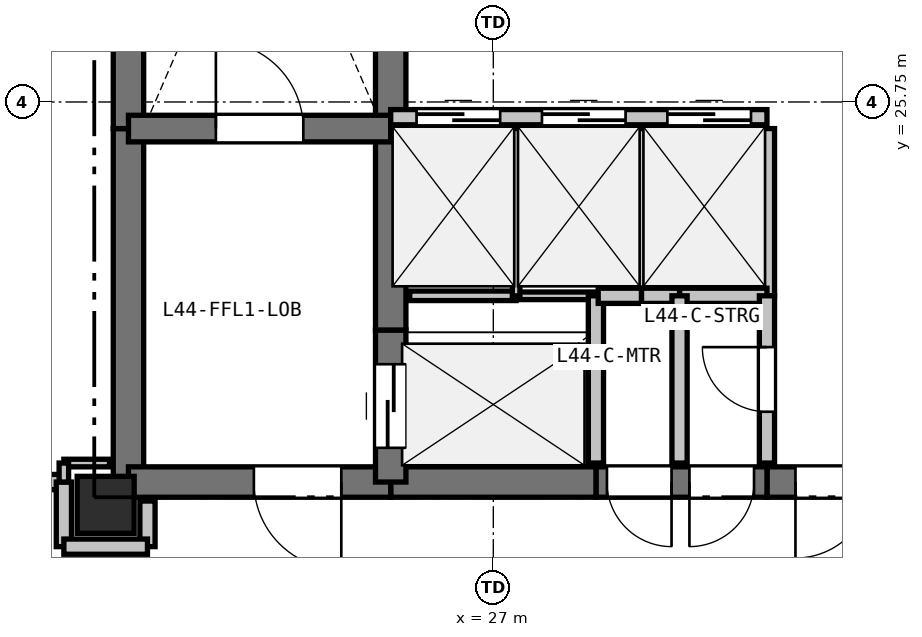
"""IFC4 building model, lengths in metres.
Left out: names, types, materials, properties, quantities, classifications, styles, units other than length and angle.
Written with IfcOpenShell. Run it as: python <this file> out.ifc"""

import sys

from ifc_helpers import new_model, si_unit, direction, frame, frame_2d, origin, origin_2d, place, context, subcontext, project, spatial, rectangle, extrude, element, fill, save


model = new_model("IFC4")
c1 = context("Model", 3, precision=1e-05, world=origin(), true_north=direction((0.0, 1.0)))
c2 = subcontext(c1, "Body", "Model", "MODEL_VIEW")
j1 = project(units=[si_unit("LENGTHUNIT", "METRE"), si_unit("PLANEANGLEUNIT", "RADIAN")], contexts=[c1])
p1 = place(None, origin())
s1 = spatial("IfcSite", under=j1, at=p1, CompositionType="ELEMENT")
p2 = place(p1, origin())
s2 = spatial("IfcBuilding", under=s1, at=p2, CompositionType="ELEMENT")
p3 = place(p2, frame((0.0, 0.0, 157.5)))
s3 = spatial("IfcBuildingStorey", under=s2, at=p3, CompositionType="ELEMENT", Elevation=157.5)
p4 = place(p3, frame((21.9, 20.45, 0.0), z_axis=(0.0, 0.0, 1.0), x_axis=(1.0, 0.0, 0.0)))
e1 = element("IfcColumn", 1, at=p4, inside=s3, PredefinedType="COLUMN", context=c2, shape_type="SweptSolid", body=[
    extrude(rectangle(XDim=0.75, YDim=0.75, at=origin_2d()), origin(), (0.0, 0.0, 1.0), 3.3),
])
p5 = place(p3, frame((22.2, 20.75, 0.0), z_axis=(0.0, 0.0, 1.0), x_axis=(0.0, 1.0, 0.0)))
e2 = element("IfcWall", 2, at=p5, inside=s3, PredefinedType="SHEAR", context=c2, shape_type="SweptSolid", body=[
    extrude(rectangle(XDim=4.65, YDim=0.4, at=frame_2d((2.325, 0.0))), origin(), (0.0, 0.0, 1.0), 2.98),
])
p6 = place(p3, frame((22.2, 25.4, 0.0), z_axis=(0.0, 0.0, 1.0), x_axis=(0.0, 1.0, 0.0)))
e3 = element("IfcWall", 3, at=p6, inside=s3, PredefinedType="SHEAR", context=c2, shape_type="SweptSolid", body=[
    extrude(rectangle(XDim=7.35, YDim=0.4, at=frame_2d((3.675, 0.0))), origin(), (0.0, 0.0, 1.0), 2.98),
])
p7 = place(p3, frame((32.35, 20.75, 0.0), z_axis=(0.0, 0.0, 1.0), x_axis=(-1.0, 0.0, 0.0)))
e4 = element("IfcWall", 4, at=p7, inside=s3, PredefinedType="SHEAR", context=c2, shape_type="SweptSolid", body=[
    extrude(rectangle(XDim=1.75, YDim=0.4, at=frame_2d((0.875, 0.0))), origin(), (0.0, 0.0, 1.0), 2.98),
])
p8 = place(p7, frame((0.375, 0.0, 0.0)))
e5 = element("IfcOpeningElement", 5, at=p8, cuts=e4, PredefinedType="OPENING", context=c2, shape_type="SweptSolid", body=[
    extrude(rectangle(XDim=1.0, YDim=2.15, at=frame_2d((0.5, 1.075))), frame((0.0, 0.21, 0.0), z_axis=(0.0, -1.0, 0.0), x_axis=(1.0, 0.0, 0.0)), (0.0, 0.0, 1.0), 0.42),
])
p9 = place(p3, frame((30.6, 20.75, 0.0), z_axis=(0.0, 0.0, 1.0), x_axis=(-1.0, 0.0, 0.0)))
e6 = element("IfcWall", 6, at=p9, inside=s3, PredefinedType="SHEAR", context=c2, shape_type="SweptSolid", body=[
    extrude(rectangle(XDim=2.25, YDim=0.4, at=frame_2d((1.125, 0.0))), origin(), (0.0, 0.0, 1.0), 2.98),
])
p10 = place(p9, frame((1.255, 0.0, 0.0)))
e7 = element("IfcOpeningElement", 7, at=p10, cuts=e6, PredefinedType="OPENING", context=c2, shape_type="SweptSolid", body=[
    extrude(rectangle(XDim=0.85, YDim=2.1, at=frame_2d((0.425, 1.05))), frame((0.0, 0.21, 0.0), z_axis=(0.0, -1.0, 0.0), x_axis=(1.0, 0.0, 0.0)), (0.0, 0.0, 1.0), 0.42),
])
p11 = place(p9, frame((0.17, 0.0, 0.0)))
e8 = element("IfcOpeningElement", 8, at=p11, cuts=e6, PredefinedType="OPENING", context=c2, shape_type="SweptSolid", body=[
    extrude(rectangle(XDim=0.85, YDim=2.1, at=frame_2d((0.425, 1.05))), frame((0.0, 0.21, 0.0), z_axis=(0.0, -1.0, 0.0), x_axis=(1.0, 0.0, 0.0)), (0.0, 0.0, 1.0), 0.42),
])
p12 = place(p3, frame((28.35, 20.75, 0.0), z_axis=(0.0, 0.0, 1.0), x_axis=(-1.0, 0.0, 0.0)))
e9 = element("IfcWall", 9, at=p12, inside=s3, PredefinedType="SHEAR", context=c2, shape_type="SweptSolid", body=[
    extrude(rectangle(XDim=2.7, YDim=0.4, at=frame_2d((1.35, 0.0))), origin(), (0.0, 0.0, 1.0), 2.98),
])
p13 = place(p3, frame((25.65, 20.75, 0.0), z_axis=(0.0, 0.0, 1.0), x_axis=(-1.0, 0.0, 0.0)))
e10 = element("IfcWall", 10, at=p13, inside=s3, PredefinedType="SHEAR", context=c2, shape_type="SweptSolid", body=[
    extrude(rectangle(XDim=3.45, YDim=0.4, at=frame_2d((1.725, 0.0))), origin(), (0.0, 0.0, 1.0), 2.98),
])
p14 = place(p13, frame((0.65, 0.0, 0.0)))
e11 = element("IfcOpeningElement", 11, at=p14, cuts=e10, PredefinedType="OPENING", context=c2, shape_type="SweptSolid", body=[
    extrude(rectangle(XDim=1.15, YDim=2.15, at=frame_2d((0.575, 1.075))), frame((0.0, 0.21, 0.0), z_axis=(0.0, -1.0, 0.0), x_axis=(1.0, 0.0, 0.0)), (0.0, 0.0, 1.0), 0.42),
])
p15 = place(p3, frame((25.65, 20.75, 0.0), z_axis=(0.0, 0.0, 1.0), x_axis=(0.0, 1.0, 0.0)))
e12 = element("IfcWall", 12, at=p15, inside=s3, PredefinedType="SHEAR", context=c2, shape_type="SweptSolid", body=[
    extrude(rectangle(XDim=2.0, YDim=0.4, at=frame_2d((1.0, 0.0))), origin(), (0.0, 0.0, 1.0), 2.98),
])
p16 = place(p15, frame((0.45, 0.0, 0.0)))
e13 = element("IfcOpeningElement", 13, at=p16, cuts=e12, PredefinedType="OPENING", context=c2, shape_type="SweptSolid", body=[
    extrude(rectangle(XDim=1.1, YDim=2.15, at=frame_2d((0.55, 1.075))), frame((0.0, 0.21, 0.0), z_axis=(0.0, -1.0, 0.0), x_axis=(1.0, 0.0, 0.0)), (0.0, 0.0, 1.0), 0.42),
])
p17 = place(p3, frame((25.65, 22.75, 0.0), z_axis=(0.0, 0.0, 1.0), x_axis=(0.0, 1.0, 0.0)))
e14 = element("IfcWall", 14, at=p17, inside=s3, PredefinedType="SHEAR", context=c2, shape_type="SweptSolid", body=[
    extrude(rectangle(XDim=2.8, YDim=0.4, at=frame_2d((1.4, 0.0))), origin(), (0.0, 0.0, 1.0), 2.98),
])
p18 = place(p3, frame((25.65, 25.55, 0.0), z_axis=(0.0, 0.0, 1.0), x_axis=(0.0, 1.0, 0.0)))
e15 = element("IfcWall", 15, at=p18, inside=s3, PredefinedType="SHEAR", context=c2, shape_type="SweptSolid", body=[
    extrude(rectangle(XDim=2.4, YDim=0.4, at=frame_2d((1.2, 0.0))), origin(), (0.0, 0.0, 1.0), 2.98),
])
p19 = place(p3, frame((22.2, 25.4, 0.0), z_axis=(0.0, 0.0, 1.0), x_axis=(1.0, 0.0, 0.0)))
e16 = element("IfcWall", 16, at=p19, inside=s3, PredefinedType="SHEAR", context=c2, shape_type="SweptSolid", body=[
    extrude(rectangle(XDim=3.45, YDim=0.35, at=frame_2d((1.725, 0.0))), origin(), (0.0, 0.0, 1.0), 2.98),
])
p20 = place(p19, frame((1.15, 0.0, 0.0)))
e17 = element("IfcOpeningElement", 17, at=p20, cuts=e16, PredefinedType="OPENING", context=c2, shape_type="SweptSolid", body=[
    extrude(rectangle(XDim=1.15, YDim=2.15, at=frame_2d((0.575, 1.075))), frame((0.0, 0.185, 0.0), z_axis=(0.0, -1.0, 0.0), x_axis=(1.0, 0.0, 0.0)), (0.0, 0.0, 1.0), 0.37),
])
p21 = place(p3, frame((25.65, 25.55, 0.0), z_axis=(0.0, 0.0, 1.0), x_axis=(1.0, 0.0, 0.0)))
e18 = element("IfcWall", 18, at=p21, inside=s3, PredefinedType="PARTITIONING", context=c2, shape_type="SweptSolid", body=[
    extrude(rectangle(XDim=4.95, YDim=0.2, at=frame_2d((2.475, 0.0))), origin(), (0.0, 0.0, 1.0), 2.98),
])
p22 = place(p21, frame((0.34, 0.0, 0.0)))
e19 = element("IfcOpeningElement", 19, at=p22, cuts=e18, PredefinedType="OPENING", context=c2, shape_type="SweptSolid", body=[
    extrude(rectangle(XDim=1.1, YDim=2.15, at=frame_2d((0.55, 1.075))), frame((0.0, 0.11, 0.0), z_axis=(0.0, -1.0, 0.0), x_axis=(1.0, 0.0, 0.0)), (0.0, 0.0, 1.0), 0.22),
])
p23 = place(p21, frame((1.99, 0.0, 0.0)))
e20 = element("IfcOpeningElement", 20, at=p23, cuts=e18, PredefinedType="OPENING", context=c2, shape_type="SweptSolid", body=[
    extrude(rectangle(XDim=1.1, YDim=2.15, at=frame_2d((0.55, 1.075))), frame((0.0, 0.11, 0.0), z_axis=(0.0, -1.0, 0.0), x_axis=(1.0, 0.0, 0.0)), (0.0, 0.0, 1.0), 0.22),
])
p24 = place(p21, frame((3.64, 0.0, 0.0)))
e21 = element("IfcOpeningElement", 21, at=p24, cuts=e18, PredefinedType="OPENING", context=c2, shape_type="SweptSolid", body=[
    extrude(rectangle(XDim=1.1, YDim=2.15, at=frame_2d((0.55, 1.075))), frame((0.0, 0.11, 0.0), z_axis=(0.0, -1.0, 0.0), x_axis=(1.0, 0.0, 0.0)), (0.0, 0.0, 1.0), 0.22),
])
p25 = place(p3, frame((25.9, 23.2, 0.0), z_axis=(0.0, 0.0, 1.0), x_axis=(1.0, 0.0, 0.0)))
e22 = element("IfcWall", 22, at=p25, inside=s3, PredefinedType="PARTITIONING", context=c2, shape_type="SweptSolid", body=[
    extrude(rectangle(XDim=1.4, YDim=0.125, at=frame_2d((0.7, 0.0))), origin(), (0.0, 0.0, 1.0), 2.98),
])
p26 = place(p3, frame((27.3, 23.2, 0.0), z_axis=(0.0, 0.0, 1.0), x_axis=(1.0, 0.0, 0.0)))
e23 = element("IfcWall", 23, at=p26, inside=s3, PredefinedType="PARTITIONING", context=c2, shape_type="SweptSolid", body=[
    extrude(rectangle(XDim=1.05, YDim=0.1, at=frame_2d((0.525, 0.0))), origin(), (0.0, 0.0, 1.0), 2.98),
])
p27 = place(p3, frame((28.35, 23.2, 0.0), z_axis=(0.0, 0.0, 1.0), x_axis=(0.0, -1.0, 0.0)))
e24 = element("IfcWall", 24, at=p27, inside=s3, PredefinedType="PARTITIONING", context=c2, shape_type="SweptSolid", body=[
    extrude(rectangle(XDim=2.2, YDim=0.2, at=frame_2d((1.1, 0.0))), origin(), (0.0, 0.0, 1.0), 2.98),
])
p28 = place(p3, frame((27.3, 25.4, 0.0), z_axis=(0.0, 0.0, 1.0), x_axis=(0.0, -1.0, 0.0)))
e25 = element("IfcWall", 25, at=p28, inside=s3, PredefinedType="PARTITIONING", context=c2, shape_type="SweptSolid", body=[
    extrude(rectangle(XDim=2.2, YDim=0.1, at=frame_2d((1.1, 0.0))), origin(), (0.0, 0.0, 1.0), 2.98),
])
p29 = place(p3, frame((28.95, 25.4, 0.0), z_axis=(0.0, 0.0, 1.0), x_axis=(0.0, -1.0, 0.0)))
e26 = element("IfcWall", 26, at=p29, inside=s3, PredefinedType="PARTITIONING", context=c2, shape_type="SweptSolid", body=[
    extrude(rectangle(XDim=2.2, YDim=0.125, at=frame_2d((1.1, 0.0))), origin(), (0.0, 0.0, 1.0), 2.98),
])
p30 = place(p3, frame((28.95, 23.2, 0.0), z_axis=(0.0, 0.0, 1.0), x_axis=(-1.0, 0.0, 0.0)))
e27 = element("IfcWall", 27, at=p30, inside=s3, PredefinedType="PARTITIONING", context=c2, shape_type="SweptSolid", body=[
    extrude(rectangle(XDim=0.57, YDim=0.2, at=frame_2d((0.285, 0.0))), origin(), (0.0, 0.0, 1.0), 2.98),
])
p31 = place(p3, frame((30.6, 25.4, 0.0), z_axis=(0.0, 0.0, 1.0), x_axis=(0.0, -1.0, 0.0)))
e28 = element("IfcWall", 28, at=p31, inside=s3, PredefinedType="PARTITIONING", context=c2, shape_type="SweptSolid", body=[
    extrude(rectangle(XDim=2.2, YDim=0.2, at=frame_2d((1.1, 0.0))), origin(), (0.0, 0.0, 1.0), 2.98),
])
p32 = place(p3, frame((30.6, 23.2, 0.0), z_axis=(0.0, 0.0, 1.0), x_axis=(-1.0, 0.0, 0.0)))
e29 = element("IfcWall", 29, at=p32, inside=s3, PredefinedType="PARTITIONING", context=c2, shape_type="SweptSolid", body=[
    extrude(rectangle(XDim=1.15, YDim=0.2, at=frame_2d((0.575, 0.0))), origin(), (0.0, 0.0, 1.0), 2.98),
])
p33 = place(p3, frame((29.45, 23.2, 0.0), z_axis=(0.0, 0.0, 1.0), x_axis=(-1.0, 0.0, 0.0)))
e30 = element("IfcWall", 30, at=p33, inside=s3, PredefinedType="PARTITIONING", context=c2, shape_type="SweptSolid", body=[
    extrude(rectangle(XDim=0.5, YDim=0.2, at=frame_2d((0.25, 0.0))), origin(), (0.0, 0.0, 1.0), 2.98),
])
p34 = place(p3, frame((30.6, 21.0, 0.0), z_axis=(0.0, 0.0, 1.0), x_axis=(0.0, 1.0, 0.0)))
e31 = element("IfcWall", 31, at=p34, inside=s3, PredefinedType="PARTITIONING", context=c2, shape_type="SweptSolid", body=[
    extrude(rectangle(XDim=2.2, YDim=0.2, at=frame_2d((1.1, 0.0))), origin(), (0.0, 0.0, 1.0), 2.98),
])
p35 = place(p34, frame((0.675, 0.0, 0.0)))
e32 = element("IfcOpeningElement", 32, at=p35, cuts=e31, PredefinedType="OPENING", context=c2, shape_type="SweptSolid", body=[
    extrude(rectangle(XDim=0.85, YDim=2.1, at=frame_2d((0.425, 1.05))), frame((0.0, 0.11, 0.0), z_axis=(0.0, -1.0, 0.0), x_axis=(1.0, 0.0, 0.0)), (0.0, 0.0, 1.0), 0.22),
])
p36 = place(p3, frame((22.45, 19.9, 0.0), z_axis=(0.0, 0.0, 1.0), x_axis=(0.0, 1.0, 0.0)))
e33 = element("IfcWall", 33, at=p36, inside=s3, PredefinedType="PARTITIONING", context=c2, shape_type="SweptSolid", body=[
    extrude(rectangle(XDim=0.6, YDim=0.2, at=frame_2d((0.3, 0.0))), origin(), (0.0, 0.0, 1.0), 2.428),
])
p37 = place(p3, frame((20.0, 20.75, 0.0), z_axis=(0.0, 0.0, 1.0), x_axis=(1.0, 0.0, 0.0)))
e34 = element("IfcWall", 34, at=p37, inside=s3, PredefinedType="PARTITIONING", context=c2, shape_type="SweptSolid", body=[
    extrude(rectangle(XDim=1.35, YDim=0.2, at=frame_2d((0.675, 0.0))), origin(), (0.0, 0.0, 1.0), 2.428),
])
p38 = place(p37, frame((0.175, 0.0, 0.0)))
e35 = element("IfcOpeningElement", 35, at=p38, cuts=e34, PredefinedType="OPENING", context=c2, shape_type="SweptSolid", body=[
    extrude(rectangle(XDim=1.0, YDim=2.15, at=frame_2d((0.5, 1.075))), frame((0.0, 0.11, 0.0), z_axis=(0.0, -1.0, 0.0), x_axis=(1.0, 0.0, 0.0)), (0.0, 0.0, 1.0), 0.22),
])
p39 = place(p3, frame((21.35, 20.75, 0.0), z_axis=(0.0, 0.0, 1.0), x_axis=(0.0, -1.0, 0.0)))
e36 = element("IfcWall", 36, at=p39, inside=s3, PredefinedType="PARTITIONING", context=c2, shape_type="SweptSolid", body=[
    extrude(rectangle(XDim=0.85, YDim=0.2, at=frame_2d((0.425, 0.0))), origin(), (0.0, 0.0, 1.0), 2.428),
])
p40 = place(p3, frame((21.35, 19.9, 0.0), z_axis=(0.0, 0.0, 1.0), x_axis=(1.0, 0.0, 0.0)))
e37 = element("IfcWall", 37, at=p40, inside=s3, PredefinedType="PARTITIONING", context=c2, shape_type="SweptSolid", body=[
    extrude(rectangle(XDim=1.1, YDim=0.2, at=frame_2d((0.55, 0.0))), origin(), (0.0, 0.0, 1.0), 2.428),
])
p41 = place(p3, frame((29.45, 23.2, 0.0), z_axis=(0.0, 0.0, 1.0), x_axis=(0.0, -1.0, 0.0)))
e38 = element("IfcWall", 38, at=p41, inside=s3, PredefinedType="PARTITIONING", context=c2, shape_type="SweptSolid", body=[
    extrude(rectangle(XDim=2.2, YDim=0.2, at=frame_2d((1.1, 0.0))), origin(), (0.0, 0.0, 1.0), 2.98),
])
p42 = place(p3, frame((21.95, 21.0, 0.0), z_axis=(0.0, 0.0, 1.0), x_axis=(-1.0, 0.0, 0.0)))
e39 = element("IfcWall", 39, at=p42, inside=s3, PredefinedType="PARTITIONING", context=c2, shape_type="SweptSolid", body=[
    extrude(rectangle(XDim=0.6, YDim=0.1, at=frame_2d((0.3, 0.0))), origin(), (0.0, 0.0, 1.0), 2.505),
])
p43 = place(p3, frame((21.35, 21.0, 0.0), z_axis=(0.0, 0.0, 1.0), x_axis=(0.0, -1.0, 0.0)))
e40 = element("IfcWall", 40, at=p43, inside=s3, PredefinedType="PARTITIONING", context=c2, shape_type="SweptSolid", body=[
    extrude(rectangle(XDim=0.25, YDim=0.125, at=frame_2d((0.125, 0.0))), origin(), (0.0, 0.0, 1.0), 2.98),
])
p44 = place(p22, origin())
e41 = element("IfcDoor", 41, at=p44, inside=s3, OperationType="SLIDING_TO_LEFT", PredefinedType="DOOR", context=c2, shape_type="SweptSolid", body=[
    extrude(rectangle(XDim=1.1, YDim=2.15, at=frame_2d((0.55, 1.075))), frame((0.0, 0.025, 0.0), z_axis=(0.0, -1.0, 0.0), x_axis=(1.0, 0.0, 0.0)), (0.0, 0.0, 1.0), 0.05),
])
fill(e19, e41)
p45 = place(p23, origin())
e42 = element("IfcDoor", 42, at=p45, inside=s3, OperationType="SLIDING_TO_LEFT", PredefinedType="DOOR", context=c2, shape_type="SweptSolid", body=[
    extrude(rectangle(XDim=1.1, YDim=2.15, at=frame_2d((0.55, 1.075))), frame((0.0, 0.025, 0.0), z_axis=(0.0, -1.0, 0.0), x_axis=(1.0, 0.0, 0.0)), (0.0, 0.0, 1.0), 0.05),
])
fill(e20, e42)
p46 = place(p24, origin())
e43 = element("IfcDoor", 43, at=p46, inside=s3, OperationType="SLIDING_TO_LEFT", PredefinedType="DOOR", context=c2, shape_type="SweptSolid", body=[
    extrude(rectangle(XDim=1.1, YDim=2.15, at=frame_2d((0.55, 1.075))), frame((0.0, 0.025, 0.0), z_axis=(0.0, -1.0, 0.0), x_axis=(1.0, 0.0, 0.0)), (0.0, 0.0, 1.0), 0.05),
])
fill(e21, e43)
p47 = place(p8, origin())
e44 = element("IfcDoor", 44, at=p47, inside=s3, OperationType="SINGLE_SWING_RIGHT", PredefinedType="DOOR", context=c2, shape_type="SweptSolid", body=[
    extrude(rectangle(XDim=1.0, YDim=2.15, at=frame_2d((0.5, 1.075))), frame((0.0, 0.025, 0.0), z_axis=(0.0, -1.0, 0.0), x_axis=(1.0, 0.0, 0.0)), (0.0, 0.0, 1.0), 0.05),
])
fill(e5, e44)
p48 = place(p16, origin())
e45 = element("IfcDoor", 45, at=p48, inside=s3, OperationType="SLIDING_TO_LEFT", PredefinedType="DOOR", context=c2, shape_type="SweptSolid", body=[
    extrude(rectangle(XDim=1.1, YDim=2.15, at=frame_2d((0.55, 1.075))), frame((0.0, 0.025, 0.0), z_axis=(0.0, -1.0, 0.0), x_axis=(1.0, 0.0, 0.0)), (0.0, 0.0, 1.0), 0.05),
])
fill(e13, e45)
p49 = place(p20, origin())
e46 = element("IfcDoor", 46, at=p49, inside=s3, OperationType="SINGLE_SWING_LEFT", PredefinedType="DOOR", context=c2, shape_type="SweptSolid", body=[
    extrude(rectangle(XDim=1.15, YDim=2.15, at=frame_2d((0.575, 1.075))), frame((0.0, 0.025, 0.0), z_axis=(0.0, -1.0, 0.0), x_axis=(1.0, 0.0, 0.0)), (0.0, 0.0, 1.0), 0.05),
])
fill(e17, e46)
p50 = place(p14, origin())
e47 = element("IfcDoor", 47, at=p50, inside=s3, OperationType="SINGLE_SWING_LEFT", PredefinedType="DOOR", context=c2, shape_type="SweptSolid", body=[
    extrude(rectangle(XDim=1.15, YDim=2.15, at=frame_2d((0.575, 1.075))), frame((0.0, 0.025, 0.0), z_axis=(0.0, -1.0, 0.0), x_axis=(1.0, 0.0, 0.0)), (0.0, 0.0, 1.0), 0.05),
])
fill(e11, e47)
p51 = place(p35, origin())
e48 = element("IfcDoor", 48, at=p51, inside=s3, OperationType="SINGLE_SWING_RIGHT", PredefinedType="DOOR", context=c2, shape_type="SweptSolid", body=[
    extrude(rectangle(XDim=0.85, YDim=2.1, at=frame_2d((0.425, 1.05))), frame((0.0, 0.025, 0.0), z_axis=(0.0, -1.0, 0.0), x_axis=(1.0, 0.0, 0.0)), (0.0, 0.0, 1.0), 0.05),
])
fill(e32, e48)
p52 = place(p10, origin())
e49 = element("IfcDoor", 49, at=p52, inside=s3, OperationType="SINGLE_SWING_LEFT", PredefinedType="DOOR", context=c2, shape_type="SweptSolid", body=[
    extrude(rectangle(XDim=0.85, YDim=2.1, at=frame_2d((0.425, 1.05))), frame((0.0, 0.025, 0.0), z_axis=(0.0, -1.0, 0.0), x_axis=(1.0, 0.0, 0.0)), (0.0, 0.0, 1.0), 0.05),
])
fill(e7, e49)
p53 = place(p11, origin())
e50 = element("IfcDoor", 50, at=p53, inside=s3, OperationType="SINGLE_SWING_RIGHT", PredefinedType="DOOR", context=c2, shape_type="SweptSolid", body=[
    extrude(rectangle(XDim=0.85, YDim=2.1, at=frame_2d((0.425, 1.05))), frame((0.0, 0.025, 0.0), z_axis=(0.0, -1.0, 0.0), x_axis=(1.0, 0.0, 0.0)), (0.0, 0.0, 1.0), 0.05),
])
fill(e8, e50)
save(model, sys.argv[1])
